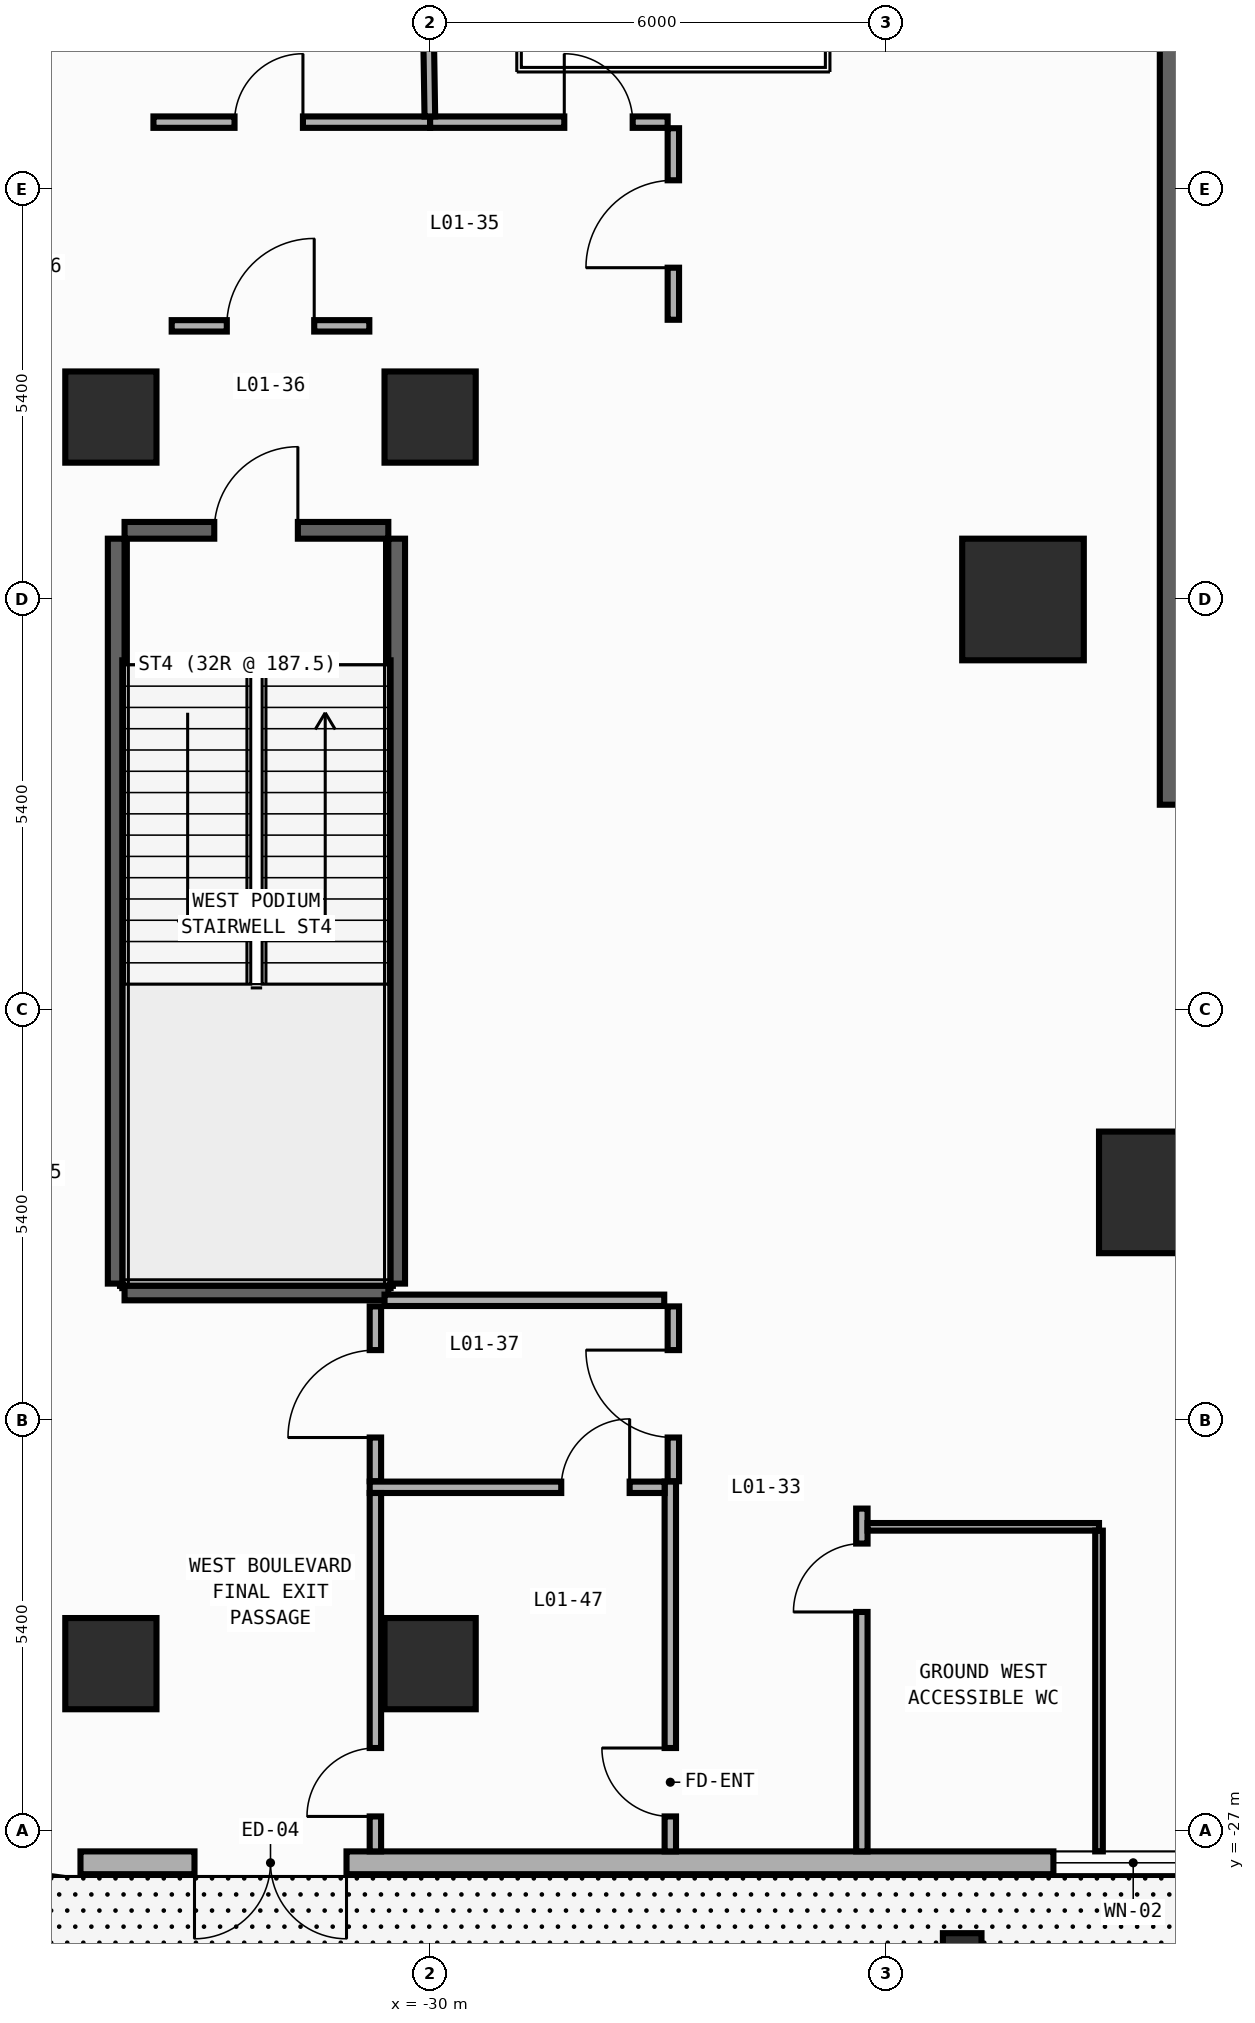
"""IFC4 building model, lengths in metres.
Left out: names, types, materials, properties, quantities, classifications, styles, units other than length and angle.
Written with IfcOpenShell. Run it as: python <this file> out.ifc"""

import sys

from ifc_helpers import new_model, si_unit, direction, frame, frame_2d, origin, origin_2d, place, context, subcontext, project, spatial, rectangle, hollow_circle, extrude, element, fill, save


model = new_model("IFC4")
c1 = context("Model", 3, precision=1e-05, world=origin(), true_north=direction((0.0, 1.0)))
c2 = subcontext(c1, "Body", "Model", "MODEL_VIEW")
j1 = project(units=[si_unit("LENGTHUNIT", "METRE"), si_unit("PLANEANGLEUNIT", "RADIAN")], contexts=[c1])
p1 = place(None, origin())
s1 = spatial("IfcSite", under=j1, at=p1, CompositionType="ELEMENT")
p2 = place(p1, origin())
s2 = spatial("IfcBuilding", under=s1, at=p2, CompositionType="ELEMENT")
p3 = place(p2, origin())
s3 = spatial("IfcBuildingStorey", under=s2, at=p3, CompositionType="ELEMENT", Elevation=0.0)
p4 = place(p3, frame((-23.0, -28.6, -0.2), z_axis=(0.0, 0.0, 1.0), x_axis=(1.0, 0.0, 0.0)))
e1 = element("IfcColumn", 1, at=p4, inside=s3, PredefinedType="COLUMN", context=c2, shape_type="SweptSolid", body=[
    extrude(hollow_circle(Radius=0.254, WallThickness=0.025, at=origin_2d()), origin(), (0.0, 0.0, 1.0), 5.6),
])
p5 = place(p3, frame((-20.0, -13.5, 0.0), z_axis=(0.0, 0.0, 1.0), x_axis=(0.0, 1.0, 0.0)))
e2 = element("IfcWall", 2, at=p5, inside=s3, PredefinedType="SHEAR", context=c2, shape_type="SweptSolid", body=[
    extrude(rectangle(XDim=27.0, YDim=0.8, at=frame_2d((13.5, 0.0))), origin(), (0.0, 0.0, 1.0), 5.7),
])
p6 = place(p3, frame((-34.02, -9.89, 0.0), z_axis=(0.0, 0.0, 1.0), x_axis=(1.0, 0.0, 0.0)))
e3 = element("IfcWall", 3, at=p6, inside=s3, PredefinedType="SHEAR", context=c2, shape_type="SweptSolid", body=[
    extrude(rectangle(XDim=3.47, YDim=0.22, at=frame_2d((1.735, 0.0))), origin(), (0.0, 0.0, 1.0), 5.7),
])
p7 = place(p6, frame((1.18, 0.0, 0.0)))
e4 = element("IfcOpeningElement", 4, at=p7, cuts=e3, PredefinedType="OPENING", context=c2, shape_type="SweptSolid", body=[
    extrude(rectangle(XDim=1.1, YDim=2.2, at=frame_2d((0.55, 1.1))), frame((0.0, 0.12, 0.0), z_axis=(0.0, -1.0, 0.0), x_axis=(1.0, 0.0, 0.0)), (0.0, 0.0, 1.0), 0.24),
])
p8 = place(p3, frame((-34.02, -19.91, 0.0), z_axis=(0.0, 0.0, 1.0), x_axis=(1.0, 0.0, 0.0)))
e5 = element("IfcWall", 5, at=p8, inside=s3, PredefinedType="SHEAR", context=c2, shape_type="SweptSolid", body=[
    extrude(rectangle(XDim=3.47, YDim=0.22, at=frame_2d((1.735, 0.0))), origin(), (0.0, 0.0, 1.0), 5.7),
])
for number, where, z_axis, x_axis in (
    (6, (-34.13, -19.8, 0.0), (0.0, 0.0, 1.0), (0.0, 1.0, 0.0)),
    (7, (-30.44, -19.8, 0.0), (0.0, 0.0, 1.0), (0.0, 1.0, 0.0)),
):
    element("IfcWall", number, at=place(p3, frame(where, z_axis=z_axis, x_axis=x_axis)), inside=s3, PredefinedType="SHEAR", context=c2, shape_type="SweptSolid", body=[
        extrude(rectangle(XDim=9.8, YDim=0.22, at=frame_2d((4.9, 0.0))), origin(), (0.0, 0.0, 1.0), 5.7),
    ])
p9 = place(p3, frame((-20.4, -18.6, 0.0), z_axis=(0.0, 0.0, 1.0), x_axis=(1.0, 0.0, 0.0)))
e8 = element("IfcColumn", 8, at=p9, inside=s3, PredefinedType="COLUMN", context=c2, shape_type="SweptSolid", body=[
    extrude(rectangle(XDim=1.6, YDim=1.6, at=origin_2d()), origin(), (0.0, 0.0, 1.0), 6.0),
])
for number, where, z_axis, x_axis in (
    (9, (-34.2, -24.8, 0.0), (0.0, 0.0, 1.0), (1.0, 0.0, 0.0)),
    (10, (-34.2, -8.4, 0.0), (0.0, 0.0, 1.0), (1.0, 0.0, 0.0)),
    (11, (-30.0, -24.8, 0.0), (0.0, 0.0, 1.0), (1.0, 0.0, 0.0)),
    (12, (-30.0, -8.4, 0.0), (0.0, 0.0, 1.0), (1.0, 0.0, 0.0)),
):
    element("IfcColumn", number, at=place(p3, frame(where, z_axis=z_axis, x_axis=x_axis)), inside=s3, PredefinedType="COLUMN", context=c2, shape_type="SweptSolid", body=[
        extrude(rectangle(XDim=1.2, YDim=1.2, at=origin_2d()), origin(), (0.0, 0.0, 1.0), 6.0),
    ])
p10 = place(p3, frame((-22.2, -10.8, 0.0), z_axis=(0.0, 0.0, 1.0), x_axis=(1.0, 0.0, 0.0)))
e13 = element("IfcColumn", 13, at=p10, inside=s3, PredefinedType="COLUMN", context=c2, shape_type="SweptSolid", body=[
    extrude(rectangle(XDim=1.6, YDim=1.6, at=origin_2d()), origin(), (0.0, 0.0, 1.0), 6.0),
])
p11 = place(p3, frame((-8.2, -27.42, 0.0), z_axis=(0.0, 0.0, 1.0), x_axis=(-1.0, 0.0, 0.0)))
e14 = element("IfcWall", 14, at=p11, inside=s3, PredefinedType="STANDARD", context=c2, shape_type="SweptSolid", body=[
    extrude(rectangle(XDim=26.4, YDim=0.3, at=frame_2d((13.2, 0.0))), origin(), (0.0, 0.0, 1.0), 5.7),
])
p12 = place(p11, frame((22.9, 0.0, 0.0)))
e15 = element("IfcOpeningElement", 15, at=p12, cuts=e14, PredefinedType="OPENING", context=c2, shape_type="SweptSolid", body=[
    extrude(rectangle(XDim=2.0, YDim=2.4, at=frame_2d((1.0, 1.2))), frame((0.0, 0.16, 0.0), z_axis=(0.0, -1.0, 0.0), x_axis=(1.0, 0.0, 0.0)), (0.0, 0.0, 1.0), 0.32),
])
p13 = place(p11, frame((4.5, 0.0, 0.85)))
e16 = element("IfcOpeningElement", 16, at=p13, cuts=e14, PredefinedType="OPENING", context=c2, shape_type="SweptSolid", body=[
    extrude(rectangle(XDim=2.4, YDim=2.5, at=frame_2d((1.2, 1.25))), frame((0.0, 0.16, 0.0), z_axis=(0.0, -1.0, 0.0), x_axis=(1.0, 0.0, 0.0)), (0.0, 0.0, 1.0), 0.32),
])
p14 = place(p11, frame((11.5, 0.0, 0.85)))
e17 = element("IfcOpeningElement", 17, at=p14, cuts=e14, PredefinedType="OPENING", context=c2, shape_type="SweptSolid", body=[
    extrude(rectangle(XDim=2.1, YDim=2.0, at=frame_2d((1.05, 1.0))), frame((0.0, 0.16, 0.0), z_axis=(0.0, -1.0, 0.0), x_axis=(1.0, 0.0, 0.0)), (0.0, 0.0, 1.0), 0.32),
])
p15 = place(p3, frame((-33.4, -7.2, 0.0), z_axis=(0.0, 0.0, 1.0), x_axis=(1.0, 0.0, 0.0)))
e18 = element("IfcWall", 18, at=p15, inside=s3, PredefinedType="PARTITIONING", context=c2, shape_type="SweptSolid", body=[
    extrude(rectangle(XDim=2.6, YDim=0.15, at=frame_2d((1.3, 0.0))), origin(), (0.0, 0.0, 1.0), 5.7),
])
p16 = place(p15, frame((0.725, 0.0, 0.0)))
e19 = element("IfcOpeningElement", 19, at=p16, cuts=e18, PredefinedType="OPENING", context=c2, shape_type="SweptSolid", body=[
    extrude(rectangle(XDim=1.15, YDim=2.2, at=frame_2d((0.575, 1.1))), frame((0.0, 0.085, 0.0), z_axis=(0.0, -1.0, 0.0), x_axis=(1.0, 0.0, 0.0)), (0.0, 0.0, 1.0), 0.17),
])
p17 = place(p3, frame((-26.8, -7.12, 0.0), z_axis=(0.0, 0.0, 1.0), x_axis=(0.0, 1.0, 0.0)))
e20 = element("IfcWall", 20, at=p17, inside=s3, PredefinedType="PARTITIONING", context=c2, shape_type="SweptSolid", body=[
    extrude(rectangle(XDim=2.52, YDim=0.15, at=frame_2d((1.26, 0.0))), origin(), (0.0, 0.0, 1.0), 5.7),
])
p18 = place(p17, frame((0.685, 0.0, 0.0)))
e21 = element("IfcOpeningElement", 21, at=p18, cuts=e20, PredefinedType="OPENING", context=c2, shape_type="SweptSolid", body=[
    extrude(rectangle(XDim=1.15, YDim=2.2, at=frame_2d((0.575, 1.1))), frame((0.0, 0.085, 0.0), z_axis=(0.0, -1.0, 0.0), x_axis=(1.0, 0.0, 0.0)), (0.0, 0.0, 1.0), 0.17),
])
p19 = place(p3, frame((-26.8, -22.4, 0.0), z_axis=(0.0, 0.0, 1.0), x_axis=(0.0, 1.0, 0.0)))
e22 = element("IfcWall", 22, at=p19, inside=s3, PredefinedType="PARTITIONING", context=c2, shape_type="SweptSolid", body=[
    extrude(rectangle(XDim=2.3, YDim=0.15, at=frame_2d((1.15, 0.0))), origin(), (0.0, 0.0, 1.0), 5.7),
])
p20 = place(p19, frame((0.575, 0.0, 0.0)))
e23 = element("IfcOpeningElement", 23, at=p20, cuts=e22, PredefinedType="OPENING", context=c2, shape_type="SweptSolid", body=[
    extrude(rectangle(XDim=1.15, YDim=2.2, at=frame_2d((0.575, 1.1))), frame((0.0, 0.085, 0.0), z_axis=(0.0, -1.0, 0.0), x_axis=(1.0, 0.0, 0.0)), (0.0, 0.0, 1.0), 0.17),
])
p21 = place(p3, frame((-30.72, -22.4, 0.0), z_axis=(0.0, 0.0, 1.0), x_axis=(0.0, 1.0, 0.0)))
e24 = element("IfcWall", 24, at=p21, inside=s3, PredefinedType="PARTITIONING", context=c2, shape_type="SweptSolid", body=[
    extrude(rectangle(XDim=2.3, YDim=0.15, at=frame_2d((1.15, 0.0))), origin(), (0.0, 0.0, 1.0), 5.7),
])
p22 = place(p21, frame((0.575, 0.0, 0.0)))
e25 = element("IfcOpeningElement", 25, at=p22, cuts=e24, PredefinedType="OPENING", context=c2, shape_type="SweptSolid", body=[
    extrude(rectangle(XDim=1.15, YDim=2.2, at=frame_2d((0.575, 1.1))), frame((0.0, 0.085, 0.0), z_axis=(0.0, -1.0, 0.0), x_axis=(1.0, 0.0, 0.0)), (0.0, 0.0, 1.0), 0.17),
])
p23 = place(p3, frame((-30.6, -20.02, 0.0), z_axis=(0.0, 0.0, 1.0), x_axis=(1.0, 0.0, 0.0)))
e26 = element("IfcWall", 26, at=p23, inside=s3, PredefinedType="PARTITIONING", context=c2, shape_type="SweptSolid", body=[
    extrude(rectangle(XDim=3.68, YDim=0.15, at=frame_2d((1.84, 0.0))), origin(), (0.0, 0.0, 1.0), 5.7),
])
p24 = place(p3, frame((-26.84, -27.27, 0.0), z_axis=(0.0, 0.0, 1.0), x_axis=(0.0, 1.0, 0.0)))
e27 = element("IfcWall", 27, at=p24, inside=s3, PredefinedType="PARTITIONING", context=c2, shape_type="SweptSolid", body=[
    extrude(rectangle(XDim=4.865, YDim=0.15, at=frame_2d((2.433, 0.0))), origin(), (0.0, 0.0, 1.0), 5.7),
])
p25 = place(p24, frame((0.46, 0.0, 0.0)))
e28 = element("IfcOpeningElement", 28, at=p25, cuts=e27, PredefinedType="OPENING", context=c2, shape_type="SweptSolid", body=[
    extrude(rectangle(XDim=0.9, YDim=2.15, at=frame_2d((0.45, 1.075))), frame((0.0, 0.085, 0.0), z_axis=(0.0, -1.0, 0.0), x_axis=(1.0, 0.0, 0.0)), (0.0, 0.0, 1.0), 0.17),
])
p26 = place(p3, frame((-24.32, -27.27, 0.0), z_axis=(0.0, 0.0, 1.0), x_axis=(0.0, 1.0, 0.0)))
e29 = element("IfcWall", 29, at=p26, inside=s3, PredefinedType="PARTITIONING", context=c2, shape_type="SweptSolid", body=[
    extrude(rectangle(XDim=4.51, YDim=0.15, at=frame_2d((2.255, 0.0))), origin(), (0.0, 0.0, 1.0), 5.7),
])
p27 = place(p26, frame((3.15, 0.0, 0.0)))
e30 = element("IfcOpeningElement", 30, at=p27, cuts=e29, PredefinedType="OPENING", context=c2, shape_type="SweptSolid", body=[
    extrude(rectangle(XDim=0.9, YDim=2.15, at=frame_2d((0.45, 1.075))), frame((0.0, 0.085, 0.0), z_axis=(0.0, -1.0, 0.0), x_axis=(1.0, 0.0, 0.0)), (0.0, 0.0, 1.0), 0.17),
])
p28 = place(p3, frame((-33.64, -4.52, 0.0), z_axis=(0.0, 0.0, 1.0), x_axis=(1.0, 0.0, 0.0)))
e31 = element("IfcWall", 31, at=p28, inside=s3, PredefinedType="PARTITIONING", context=c2, shape_type="SweptSolid", body=[
    extrude(rectangle(XDim=3.64, YDim=0.15, at=frame_2d((1.82, 0.0))), origin(), (0.0, 0.0, 1.0), 5.7),
])
p29 = place(p28, frame((1.067, 0.0, 0.0)))
e32 = element("IfcOpeningElement", 32, at=p29, cuts=e31, PredefinedType="OPENING", context=c2, shape_type="SweptSolid", body=[
    extrude(rectangle(XDim=0.9, YDim=2.15, at=frame_2d((0.45, 1.075))), frame((0.0, 0.085, 0.0), z_axis=(0.0, -1.0, 0.0), x_axis=(1.0, 0.0, 0.0)), (0.0, 0.0, 1.0), 0.17),
])
p30 = place(p3, frame((-30.0, -4.52, 0.0), z_axis=(0.0, 0.0, 1.0), x_axis=(1.0, 0.0, 0.0)))
e33 = element("IfcWall", 33, at=p30, inside=s3, PredefinedType="PARTITIONING", context=c2, shape_type="SweptSolid", body=[
    extrude(rectangle(XDim=3.125, YDim=0.15, at=frame_2d((1.562, 0.0))), origin(), (0.0, 0.0, 1.0), 5.7),
])
p31 = place(p30, frame((1.765, 0.0, 0.0)))
e34 = element("IfcOpeningElement", 34, at=p31, cuts=e33, PredefinedType="OPENING", context=c2, shape_type="SweptSolid", body=[
    extrude(rectangle(XDim=0.9, YDim=2.15, at=frame_2d((0.45, 1.075))), frame((0.0, 0.085, 0.0), z_axis=(0.0, -1.0, 0.0), x_axis=(1.0, 0.0, 0.0)), (0.0, 0.0, 1.0), 0.17),
])
p32 = place(p3, frame((-30.795, -22.48, 0.0), z_axis=(0.0, 0.0, 1.0), x_axis=(1.0, 0.0, 0.0)))
e35 = element("IfcWall", 35, at=p32, inside=s3, PredefinedType="PARTITIONING", context=c2, shape_type="SweptSolid", body=[
    extrude(rectangle(XDim=3.88, YDim=0.15, at=frame_2d((1.94, 0.0))), origin(), (0.0, 0.0, 1.0), 5.7),
])
p33 = place(p32, frame((2.52, 0.0, 0.0)))
e36 = element("IfcOpeningElement", 36, at=p33, cuts=e35, PredefinedType="OPENING", context=c2, shape_type="SweptSolid", body=[
    extrude(rectangle(XDim=0.9, YDim=2.15, at=frame_2d((0.45, 1.075))), frame((0.0, 0.085, 0.0), z_axis=(0.0, -1.0, 0.0), x_axis=(1.0, 0.0, 0.0)), (0.0, 0.0, 1.0), 0.17),
])
p34 = place(p3, frame((-30.72, -27.27, 0.0), z_axis=(0.0, 0.0, 1.0), x_axis=(0.0, 1.0, 0.0)))
e37 = element("IfcWall", 37, at=p34, inside=s3, PredefinedType="PARTITIONING", context=c2, shape_type="SweptSolid", body=[
    extrude(rectangle(XDim=4.715, YDim=0.15, at=frame_2d((2.357, 0.0))), origin(), (0.0, 0.0, 1.0), 5.7),
])
p35 = place(p34, frame((0.46, 0.0, 0.0)))
e38 = element("IfcOpeningElement", 38, at=p35, cuts=e37, PredefinedType="OPENING", context=c2, shape_type="SweptSolid", body=[
    extrude(rectangle(XDim=0.9, YDim=2.15, at=frame_2d((0.45, 1.075))), frame((0.0, 0.085, 0.0), z_axis=(0.0, -1.0, 0.0), x_axis=(1.0, 0.0, 0.0)), (0.0, 0.0, 1.0), 0.17),
])
p36 = place(p3, frame((-30.004, -4.445, 0.0), z_axis=(0.0, 0.0, 1.0), x_axis=(-0.015469783933, 0.999880335733, 0.0)))
e39 = element("IfcWall", 39, at=p36, inside=s3, PredefinedType="PARTITIONING", context=c2, shape_type="SweptSolid", body=[
    extrude(rectangle(XDim=8.806, YDim=0.14, at=frame_2d((4.403, 0.0))), origin(), (0.0, 0.0, 1.0), 4.8),
])
p37 = place(p3, frame((-24.245, -23.0, 0.0), z_axis=(0.0, 0.0, 1.0), x_axis=(1.0, 0.0, 0.0)))
e40 = element("IfcWall", 40, at=p37, inside=s3, PredefinedType="PARTITIONING", context=c2, shape_type="SweptSolid", body=[
    extrude(rectangle(XDim=3.045, YDim=0.1, at=frame_2d((1.522, 0.0))), origin(), (0.0, 0.0, 1.0), 5.7),
])
p38 = place(p3, frame((-21.2, -23.05, 0.0), z_axis=(0.0, 0.0, 1.0), x_axis=(0.0, -1.0, 0.0)))
e41 = element("IfcWall", 41, at=p38, inside=s3, PredefinedType="PARTITIONING", context=c2, shape_type="SweptSolid", body=[
    extrude(rectangle(XDim=4.22, YDim=0.1, at=frame_2d((2.11, 0.0))), origin(), (0.0, 0.0, 1.0), 5.7),
])
p39 = place(p12, origin())
e42 = element("IfcDoor", 42, at=p39, inside=s3, OperationType="DOUBLE_DOOR_SINGLE_SWING", PredefinedType="DOOR", context=c2, shape_type="SweptSolid", body=[
    extrude(rectangle(XDim=2.0, YDim=2.4, at=frame_2d((1.0, 1.2))), frame((0.0, 0.025, 0.0), z_axis=(0.0, -1.0, 0.0), x_axis=(1.0, 0.0, 0.0)), (0.0, 0.0, 1.0), 0.05),
])
fill(e15, e42)
p40 = place(p14, origin())
e43 = element("IfcWindow", 43, at=p40, inside=s3, PartitioningType="SINGLE_PANEL", PredefinedType="WINDOW", context=c2, shape_type="SweptSolid", body=[
    extrude(rectangle(XDim=2.1, YDim=2.0, at=frame_2d((1.05, 1.0))), frame((0.0, 0.03, 0.0), z_axis=(0.0, -1.0, 0.0), x_axis=(1.0, 0.0, 0.0)), (0.0, 0.0, 1.0), 0.06),
])
fill(e17, e43)
p41 = place(p7, origin())
e44 = element("IfcDoor", 44, at=p41, inside=s3, OperationType="SINGLE_SWING_RIGHT", PredefinedType="DOOR", context=c2, shape_type="SweptSolid", body=[
    extrude(rectangle(XDim=1.1, YDim=2.2, at=frame_2d((0.55, 1.1))), frame((0.0, 0.025, 0.0), z_axis=(0.0, -1.0, 0.0), x_axis=(1.0, 0.0, 0.0)), (0.0, 0.0, 1.0), 0.05),
])
fill(e4, e44)
p42 = place(p16, origin())
e45 = element("IfcDoor", 45, at=p42, inside=s3, OperationType="SINGLE_SWING_RIGHT", PredefinedType="DOOR", context=c2, shape_type="SweptSolid", body=[
    extrude(rectangle(XDim=1.15, YDim=2.2, at=frame_2d((0.575, 1.1))), frame((0.0, 0.025, 0.0), z_axis=(0.0, -1.0, 0.0), x_axis=(1.0, 0.0, 0.0)), (0.0, 0.0, 1.0), 0.05),
])
fill(e19, e45)
p43 = place(p18, origin())
e46 = element("IfcDoor", 46, at=p43, inside=s3, OperationType="SINGLE_SWING_LEFT", PredefinedType="DOOR", context=c2, shape_type="SweptSolid", body=[
    extrude(rectangle(XDim=1.15, YDim=2.2, at=frame_2d((0.575, 1.1))), frame((0.0, 0.025, 0.0), z_axis=(0.0, -1.0, 0.0), x_axis=(1.0, 0.0, 0.0)), (0.0, 0.0, 1.0), 0.05),
])
fill(e21, e46)
p44 = place(p20, origin())
e47 = element("IfcDoor", 47, at=p44, inside=s3, OperationType="SINGLE_SWING_RIGHT", PredefinedType="DOOR", context=c2, shape_type="SweptSolid", body=[
    extrude(rectangle(XDim=1.15, YDim=2.2, at=frame_2d((0.575, 1.1))), frame((0.0, 0.025, 0.0), z_axis=(0.0, -1.0, 0.0), x_axis=(1.0, 0.0, 0.0)), (0.0, 0.0, 1.0), 0.05),
])
fill(e23, e47)
p45 = place(p22, origin())
e48 = element("IfcDoor", 48, at=p45, inside=s3, OperationType="SINGLE_SWING_LEFT", PredefinedType="DOOR", context=c2, shape_type="SweptSolid", body=[
    extrude(rectangle(XDim=1.15, YDim=2.2, at=frame_2d((0.575, 1.1))), frame((0.0, 0.025, 0.0), z_axis=(0.0, -1.0, 0.0), x_axis=(1.0, 0.0, 0.0)), (0.0, 0.0, 1.0), 0.05),
])
fill(e25, e48)
p46 = place(p25, origin())
e49 = element("IfcDoor", 49, at=p46, inside=s3, OperationType="SINGLE_SWING_RIGHT", PredefinedType="DOOR", context=c2, shape_type="SweptSolid", body=[
    extrude(rectangle(XDim=0.9, YDim=2.15, at=frame_2d((0.45, 1.075))), frame((0.0, 0.025, 0.0), z_axis=(0.0, -1.0, 0.0), x_axis=(1.0, 0.0, 0.0)), (0.0, 0.0, 1.0), 0.05),
])
fill(e28, e49)
p47 = place(p27, origin())
e50 = element("IfcDoor", 50, at=p47, inside=s3, OperationType="SINGLE_SWING_LEFT", PredefinedType="DOOR", context=c2, shape_type="SweptSolid", body=[
    extrude(rectangle(XDim=0.9, YDim=2.15, at=frame_2d((0.45, 1.075))), frame((0.0, 0.025, 0.0), z_axis=(0.0, -1.0, 0.0), x_axis=(1.0, 0.0, 0.0)), (0.0, 0.0, 1.0), 0.05),
])
fill(e30, e50)
p48 = place(p29, origin())
e51 = element("IfcDoor", 51, at=p48, inside=s3, OperationType="SINGLE_SWING_RIGHT", PredefinedType="DOOR", context=c2, shape_type="SweptSolid", body=[
    extrude(rectangle(XDim=0.9, YDim=2.15, at=frame_2d((0.45, 1.075))), frame((0.0, 0.025, 0.0), z_axis=(0.0, -1.0, 0.0), x_axis=(1.0, 0.0, 0.0)), (0.0, 0.0, 1.0), 0.05),
])
fill(e32, e51)
p49 = place(p31, origin())
e52 = element("IfcDoor", 52, at=p49, inside=s3, OperationType="SINGLE_SWING_LEFT", PredefinedType="DOOR", context=c2, shape_type="SweptSolid", body=[
    extrude(rectangle(XDim=0.9, YDim=2.15, at=frame_2d((0.45, 1.075))), frame((0.0, 0.025, 0.0), z_axis=(0.0, -1.0, 0.0), x_axis=(1.0, 0.0, 0.0)), (0.0, 0.0, 1.0), 0.05),
])
fill(e34, e52)
p50 = place(p33, origin())
e53 = element("IfcDoor", 53, at=p50, inside=s3, OperationType="SINGLE_SWING_RIGHT", PredefinedType="DOOR", context=c2, shape_type="SweptSolid", body=[
    extrude(rectangle(XDim=0.9, YDim=2.15, at=frame_2d((0.45, 1.075))), frame((0.0, 0.025, 0.0), z_axis=(0.0, -1.0, 0.0), x_axis=(1.0, 0.0, 0.0)), (0.0, 0.0, 1.0), 0.05),
])
fill(e36, e53)
p51 = place(p35, origin())
e54 = element("IfcDoor", 54, at=p51, inside=s3, OperationType="SINGLE_SWING_LEFT", PredefinedType="DOOR", context=c2, shape_type="SweptSolid", body=[
    extrude(rectangle(XDim=0.9, YDim=2.15, at=frame_2d((0.45, 1.075))), frame((0.0, 0.025, 0.0), z_axis=(0.0, -1.0, 0.0), x_axis=(1.0, 0.0, 0.0)), (0.0, 0.0, 1.0), 0.05),
])
fill(e38, e54)
save(model, sys.argv[1])
